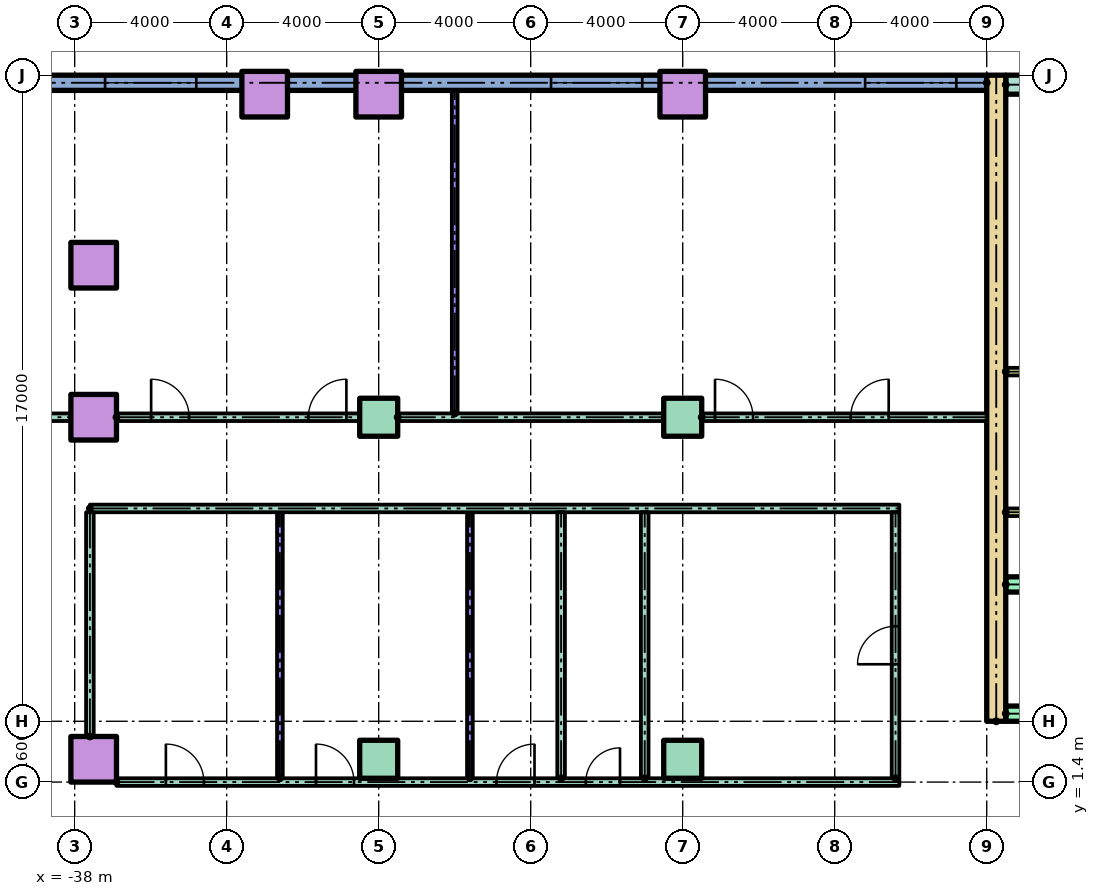
"""IFC4 building model, lengths in metres.
Left out: names, types, materials, properties, quantities, classifications, styles, units other than length and angle.
Written with IfcOpenShell. Run it as: python <this file> out.ifc"""

import sys

from ifc_helpers import new_model, si_unit, direction, frame, frame_2d, origin, origin_2d, place, context, subcontext, project, spatial, rectangle, hollow_rectangle, extrude, element, fill, save


model = new_model("IFC4")
c1 = context("Model", 3, precision=1e-05, world=origin(), true_north=direction((0.0, 1.0)))
c2 = subcontext(c1, "Body", "Model", "MODEL_VIEW")
j1 = project(units=[si_unit("LENGTHUNIT", "METRE"), si_unit("PLANEANGLEUNIT", "RADIAN")], contexts=[c1])
p1 = place(None, origin())
s1 = spatial("IfcSite", under=j1, at=p1, CompositionType="ELEMENT")
p2 = place(p1, origin())
s2 = spatial("IfcBuilding", under=s1, at=p2, CompositionType="ELEMENT")
p3 = place(p2, frame((0.0, 0.0, 18.0)))
s3 = spatial("IfcBuildingStorey", under=s2, at=p3, CompositionType="ELEMENT", Elevation=18.0)
p4 = place(p3, frame((-37.5, 2.0, 0.0)))
e1 = element("IfcColumn", 1, at=p4, inside=s3, PredefinedType="COLUMN", context=c2, shape_type="SweptSolid", body=[
    extrude(hollow_rectangle(XDim=1.2, YDim=1.2, WallThickness=0.06, at=origin_2d()), origin(), (0.0, 0.0, 1.0), 4.0),
])
for number, where in (
    (2, (-30.0, 2.0, 0.0)),
    (3, (-22.0, 2.0, 0.0)),
):
    element("IfcColumn", number, at=place(p3, frame(where)), inside=s3, PredefinedType="COLUMN", context=c2, shape_type="SweptSolid", body=[
        extrude(rectangle(XDim=1.0, YDim=1.0, at=origin_2d()), origin(), (0.0, 0.0, 1.0), 4.0),
    ])
p5 = place(p3, frame((-37.5, 11.0, 0.0)))
e4 = element("IfcColumn", 4, at=p5, inside=s3, PredefinedType="COLUMN", context=c2, shape_type="SweptSolid", body=[
    extrude(hollow_rectangle(XDim=1.2, YDim=1.2, WallThickness=0.06, at=origin_2d()), origin(), (0.0, 0.0, 1.0), 4.0),
])
for number, where in (
    (5, (-30.0, 11.0, 0.0)),
    (6, (-22.0, 11.0, 0.0)),
):
    element("IfcColumn", number, at=place(p3, frame(where)), inside=s3, PredefinedType="COLUMN", context=c2, shape_type="SweptSolid", body=[
        extrude(rectangle(XDim=1.0, YDim=1.0, at=origin_2d()), origin(), (0.0, 0.0, 1.0), 4.0),
    ])
for number, where in (
    (7, (-37.5, 15.0, 0.0)),
    (8, (-33.0, 19.5, 0.0)),
    (9, (-30.0, 19.5, 0.0)),
    (10, (-22.0, 19.5, 0.0)),
):
    element("IfcColumn", number, at=place(p3, frame(where)), inside=s3, PredefinedType="COLUMN", context=c2, shape_type="SweptSolid", body=[
        extrude(hollow_rectangle(XDim=1.2, YDim=1.2, WallThickness=0.06, at=origin_2d()), origin(), (0.0, 0.0, 1.0), 4.0),
    ])
p6 = place(p3, frame((-14.0, 19.8, 0.0), z_axis=(0.0, 0.0, 1.0), x_axis=(-1.0, 0.0, 0.0)))
e11 = element("IfcWall", 11, at=p6, inside=s3, PredefinedType="STANDARD", context=c2, shape_type="SweptSolid", body=[
    extrude(rectangle(XDim=25.6, YDim=0.4, at=frame_2d((12.8, 0.0))), origin(), (0.0, 0.0, 1.0), 3.7),
])
p7 = place(p6, frame((0.8, 0.0, 0.9)))
e12 = element("IfcOpeningElement", 12, at=p7, cuts=e11, PredefinedType="OPENING", context=c2, shape_type="SweptSolid", body=[
    extrude(rectangle(XDim=2.4, YDim=2.1, at=frame_2d((1.2, 1.05))), frame((0.0, 0.21, 0.0), z_axis=(0.0, -1.0, 0.0), x_axis=(1.0, 0.0, 0.0)), (0.0, 0.0, 1.0), 0.42),
])
p8 = place(p6, frame((9.065, 0.0, 0.9)))
e13 = element("IfcOpeningElement", 13, at=p8, cuts=e11, PredefinedType="OPENING", context=c2, shape_type="SweptSolid", body=[
    extrude(rectangle(XDim=2.4, YDim=2.1, at=frame_2d((1.2, 1.05))), frame((0.0, 0.21, 0.0), z_axis=(0.0, -1.0, 0.0), x_axis=(1.0, 0.0, 0.0)), (0.0, 0.0, 1.0), 0.42),
])
p9 = place(p6, frame((20.8, 0.0, 0.9)))
e14 = element("IfcOpeningElement", 14, at=p9, cuts=e11, PredefinedType="OPENING", context=c2, shape_type="SweptSolid", body=[
    extrude(rectangle(XDim=2.4, YDim=2.1, at=frame_2d((1.2, 1.05))), frame((0.0, 0.21, 0.0), z_axis=(0.0, -1.0, 0.0), x_axis=(1.0, 0.0, 0.0)), (0.0, 0.0, 1.0), 0.42),
])
p10 = place(p3, frame((-13.75, 3.0, 0.0), z_axis=(0.0, 0.0, 1.0), x_axis=(0.0, 1.0, 0.0)))
e15 = element("IfcWall", 15, at=p10, inside=s3, PredefinedType="SHEAR", context=c2, shape_type="SweptSolid", body=[
    extrude(rectangle(XDim=17.0, YDim=0.5, at=frame_2d((8.5, 0.0))), origin(), (0.0, 0.0, 1.0), 3.7),
])
p11 = place(p3, frame((-13.5, 19.75, 0.0)))
e16 = element("IfcWall", 16, at=p11, inside=s3, PredefinedType="SHEAR", context=c2, shape_type="SweptSolid", body=[
    extrude(rectangle(XDim=27.0, YDim=0.5, at=frame_2d((13.5, 0.0))), origin(), (0.0, 0.0, 1.0), 3.7),
])
p12 = place(p3, frame((-13.5, 3.2, 0.0)))
e17 = element("IfcWall", 17, at=p12, inside=s3, PredefinedType="SHEAR", context=c2, shape_type="SweptSolid", body=[
    extrude(rectangle(XDim=27.0, YDim=0.4, at=frame_2d((13.5, 0.0))), origin(), (0.0, 0.0, 1.0), 3.7),
])
p13 = place(p12, frame((6.861, 0.0, 0.0)))
e18 = element("IfcOpeningElement", 18, at=p13, cuts=e17, PredefinedType="OPENING", context=c2, shape_type="SweptSolid", body=[
    extrude(rectangle(XDim=1.1, YDim=2.1, at=frame_2d((0.55, 1.05))), frame((0.0, 0.21, 0.0), z_axis=(0.0, -1.0, 0.0), x_axis=(1.0, 0.0, 0.0)), (0.0, 0.0, 1.0), 0.42),
])
p14 = place(p12, frame((9.906, 0.0, 0.0)))
e19 = element("IfcOpeningElement", 19, at=p14, cuts=e17, PredefinedType="OPENING", context=c2, shape_type="SweptSolid", body=[
    extrude(rectangle(XDim=1.1, YDim=2.1, at=frame_2d((0.55, 1.05))), frame((0.0, 0.21, 0.0), z_axis=(0.0, -1.0, 0.0), x_axis=(1.0, 0.0, 0.0)), (0.0, 0.0, 1.0), 0.42),
])
p15 = place(p12, frame((15.994, 0.0, 0.0)))
e20 = element("IfcOpeningElement", 20, at=p15, cuts=e17, PredefinedType="OPENING", context=c2, shape_type="SweptSolid", body=[
    extrude(rectangle(XDim=1.1, YDim=2.1, at=frame_2d((0.55, 1.05))), frame((0.0, 0.21, 0.0), z_axis=(0.0, -1.0, 0.0), x_axis=(1.0, 0.0, 0.0)), (0.0, 0.0, 1.0), 0.42),
])
p16 = place(p12, frame((19.039, 0.0, 0.0)))
e21 = element("IfcOpeningElement", 21, at=p16, cuts=e17, PredefinedType="OPENING", context=c2, shape_type="SweptSolid", body=[
    extrude(rectangle(XDim=1.1, YDim=2.1, at=frame_2d((0.55, 1.05))), frame((0.0, 0.21, 0.0), z_axis=(0.0, -1.0, 0.0), x_axis=(1.0, 0.0, 0.0)), (0.0, 0.0, 1.0), 0.42),
])
p17 = place(p12, frame((12.6, 0.0, 0.0)))
e22 = element("IfcOpeningElement", 22, at=p17, cuts=e17, PredefinedType="OPENING", context=c2, shape_type="SweptSolid", body=[
    extrude(rectangle(XDim=1.8, YDim=2.1, at=frame_2d((0.9, 1.05))), frame((0.0, 0.21, 0.0), z_axis=(0.0, -1.0, 0.0), x_axis=(1.0, 0.0, 0.0)), (0.0, 0.0, 1.0), 0.42),
])
p18 = place(p3, frame((-13.5, 6.6, 0.0)))
e23 = element("IfcWall", 23, at=p18, inside=s3, PredefinedType="SHEAR", context=c2, shape_type="SweptSolid", body=[
    extrude(rectangle(XDim=11.978, YDim=0.4, at=frame_2d((5.989, 0.0))), origin(), (0.0, 0.0, 1.0), 3.7),
])
for number, where in (
    (24, (-13.5, 8.5, 0.0)),
    (25, (-13.5, 12.2, 0.0)),
):
    element("IfcWall", number, at=place(p3, frame(where)), inside=s3, PredefinedType="PARTITIONING", context=c2, shape_type="SweptSolid", body=[
        extrude(rectangle(XDim=3.9, YDim=0.2, at=frame_2d((1.95, 0.0))), origin(), (0.0, 0.0, 1.0), 3.7),
    ])
p19 = place(p3, frame((-36.9, 1.4, 0.0)))
e26 = element("IfcWall", 26, at=p19, inside=s3, PredefinedType="PARTITIONING", context=c2, shape_type="SweptSolid", body=[
    extrude(rectangle(XDim=20.6, YDim=0.2, at=frame_2d((10.3, 0.0))), origin(), (0.0, 0.0, 1.0), 3.7),
])
p20 = place(p19, frame((1.3, 0.0, 0.0)))
e27 = element("IfcOpeningElement", 27, at=p20, cuts=e26, PredefinedType="OPENING", context=c2, shape_type="SweptSolid", body=[
    extrude(rectangle(XDim=1.0, YDim=2.1, at=frame_2d((0.5, 1.05))), frame((0.0, 0.11, 0.0), z_axis=(0.0, -1.0, 0.0), x_axis=(1.0, 0.0, 0.0)), (0.0, 0.0, 1.0), 0.22),
])
p21 = place(p19, frame((5.25, 0.0, 0.0)))
e28 = element("IfcOpeningElement", 28, at=p21, cuts=e26, PredefinedType="OPENING", context=c2, shape_type="SweptSolid", body=[
    extrude(rectangle(XDim=1.0, YDim=2.1, at=frame_2d((0.5, 1.05))), frame((0.0, 0.11, 0.0), z_axis=(0.0, -1.0, 0.0), x_axis=(1.0, 0.0, 0.0)), (0.0, 0.0, 1.0), 0.22),
])
p22 = place(p19, frame((10.0, 0.0, 0.0)))
e29 = element("IfcOpeningElement", 29, at=p22, cuts=e26, PredefinedType="OPENING", context=c2, shape_type="SweptSolid", body=[
    extrude(rectangle(XDim=1.0, YDim=2.1, at=frame_2d((0.5, 1.05))), frame((0.0, 0.11, 0.0), z_axis=(0.0, -1.0, 0.0), x_axis=(1.0, 0.0, 0.0)), (0.0, 0.0, 1.0), 0.22),
])
p23 = place(p19, frame((12.35, 0.0, 0.0)))
e30 = element("IfcOpeningElement", 30, at=p23, cuts=e26, PredefinedType="OPENING", context=c2, shape_type="SweptSolid", body=[
    extrude(rectangle(XDim=0.9, YDim=2.1, at=frame_2d((0.45, 1.05))), frame((0.0, 0.11, 0.0), z_axis=(0.0, -1.0, 0.0), x_axis=(1.0, 0.0, 0.0)), (0.0, 0.0, 1.0), 0.22),
])
p24 = place(p3, frame((-37.6, 8.6, 0.0)))
e31 = element("IfcWall", 31, at=p24, inside=s3, PredefinedType="PARTITIONING", context=c2, shape_type="SweptSolid", body=[
    extrude(rectangle(XDim=21.3, YDim=0.2, at=frame_2d((10.65, 0.0))), origin(), (0.0, 0.0, 1.0), 3.7),
])
p25 = place(p3, frame((-39.6, 11.0, 0.0)))
e32 = element("IfcWall", 32, at=p25, inside=s3, PredefinedType="PARTITIONING", context=c2, shape_type="SweptSolid", body=[
    extrude(rectangle(XDim=1.5, YDim=0.2, at=frame_2d((0.75, 0.0))), origin(), (0.0, 0.0, 1.0), 3.7),
])
p26 = place(p3, frame((-36.9, 11.0, 0.0)))
e33 = element("IfcWall", 33, at=p26, inside=s3, PredefinedType="PARTITIONING", context=c2, shape_type="SweptSolid", body=[
    extrude(rectangle(XDim=6.4, YDim=0.2, at=frame_2d((3.2, 0.0))), origin(), (0.0, 0.0, 1.0), 3.7),
])
p27 = place(p26, frame((0.912, 0.0, 0.0)))
e34 = element("IfcOpeningElement", 34, at=p27, cuts=e33, PredefinedType="OPENING", context=c2, shape_type="SweptSolid", body=[
    extrude(rectangle(XDim=1.0, YDim=2.1, at=frame_2d((0.5, 1.05))), frame((0.0, 0.11, 0.0), z_axis=(0.0, -1.0, 0.0), x_axis=(1.0, 0.0, 0.0)), (0.0, 0.0, 1.0), 0.22),
])
p28 = place(p26, frame((5.05, 0.0, 0.0)))
e35 = element("IfcOpeningElement", 35, at=p28, cuts=e33, PredefinedType="OPENING", context=c2, shape_type="SweptSolid", body=[
    extrude(rectangle(XDim=1.0, YDim=2.1, at=frame_2d((0.5, 1.05))), frame((0.0, 0.11, 0.0), z_axis=(0.0, -1.0, 0.0), x_axis=(1.0, 0.0, 0.0)), (0.0, 0.0, 1.0), 0.22),
])
p29 = place(p3, frame((-29.5, 11.0, 0.0)))
e36 = element("IfcWall", 36, at=p29, inside=s3, PredefinedType="PARTITIONING", context=c2, shape_type="SweptSolid", body=[
    extrude(rectangle(XDim=7.0, YDim=0.2, at=frame_2d((3.5, 0.0))), origin(), (0.0, 0.0, 1.0), 3.7),
])
p30 = place(p3, frame((-21.5, 11.0, 0.0)))
e37 = element("IfcWall", 37, at=p30, inside=s3, PredefinedType="PARTITIONING", context=c2, shape_type="SweptSolid", body=[
    extrude(rectangle(XDim=7.5, YDim=0.2, at=frame_2d((3.75, 0.0))), origin(), (0.0, 0.0, 1.0), 3.7),
])
p31 = place(p30, frame((0.35, 0.0, 0.0)))
e38 = element("IfcOpeningElement", 38, at=p31, cuts=e37, PredefinedType="OPENING", context=c2, shape_type="SweptSolid", body=[
    extrude(rectangle(XDim=1.0, YDim=2.1, at=frame_2d((0.5, 1.05))), frame((0.0, 0.11, 0.0), z_axis=(0.0, -1.0, 0.0), x_axis=(1.0, 0.0, 0.0)), (0.0, 0.0, 1.0), 0.22),
])
p32 = place(p30, frame((3.92, 0.0, 0.0)))
e39 = element("IfcOpeningElement", 39, at=p32, cuts=e37, PredefinedType="OPENING", context=c2, shape_type="SweptSolid", body=[
    extrude(rectangle(XDim=1.0, YDim=2.1, at=frame_2d((0.5, 1.05))), frame((0.0, 0.11, 0.0), z_axis=(0.0, -1.0, 0.0), x_axis=(1.0, 0.0, 0.0)), (0.0, 0.0, 1.0), 0.22),
])
p33 = place(p3, frame((-37.6, 2.6, 0.0), z_axis=(0.0, 0.0, 1.0), x_axis=(0.0, 1.0, 0.0)))
e40 = element("IfcWall", 40, at=p33, inside=s3, PredefinedType="PARTITIONING", context=c2, shape_type="SweptSolid", body=[
    extrude(rectangle(XDim=5.9, YDim=0.2, at=frame_2d((2.95, 0.0))), origin(), (0.0, 0.0, 1.0), 3.7),
])
p34 = place(p3, frame((-32.6, 1.5, 0.0), z_axis=(0.0, 0.0, 1.0), x_axis=(0.0, 1.0, 0.0)))
e41 = element("IfcWall", 41, at=p34, inside=s3, PredefinedType="PARTITIONING", context=c2, shape_type="SweptSolid", body=[
    extrude(rectangle(XDim=7.0, YDim=0.15, at=frame_2d((3.5, 0.0))), origin(), (0.0, 0.0, 1.0), 3.7),
])
p35 = place(p3, frame((-28.0, 11.1, 0.0), z_axis=(0.0, 0.0, 1.0), x_axis=(0.0, 1.0, 0.0)))
e42 = element("IfcWall", 42, at=p35, inside=s3, PredefinedType="PARTITIONING", context=c2, shape_type="SweptSolid", body=[
    extrude(rectangle(XDim=8.5, YDim=0.15, at=frame_2d((4.25, 0.0))), origin(), (0.0, 0.0, 1.0), 3.7),
])
p36 = place(p3, frame((-27.6, 1.5, 0.0), z_axis=(0.0, 0.0, 1.0), x_axis=(0.0, 1.0, 0.0)))
e43 = element("IfcWall", 43, at=p36, inside=s3, PredefinedType="PARTITIONING", context=c2, shape_type="SweptSolid", body=[
    extrude(rectangle(XDim=7.0, YDim=0.15, at=frame_2d((3.5, 0.0))), origin(), (0.0, 0.0, 1.0), 3.7),
])
for number, where, z_axis, x_axis in (
    (44, (-25.2, 1.5, 0.0), (0.0, 0.0, 1.0), (0.0, 1.0, 0.0)),
    (45, (-23.0, 1.5, 0.0), (0.0, 0.0, 1.0), (0.0, 1.0, 0.0)),
):
    element("IfcWall", number, at=place(p3, frame(where, z_axis=z_axis, x_axis=x_axis)), inside=s3, PredefinedType="PARTITIONING", context=c2, shape_type="SweptSolid", body=[
        extrude(rectangle(XDim=7.0, YDim=0.2, at=frame_2d((3.5, 0.0))), origin(), (0.0, 0.0, 1.0), 3.7),
    ])
p37 = place(p3, frame((-16.4, 1.5, 0.0), z_axis=(0.0, 0.0, 1.0), x_axis=(0.0, 1.0, 0.0)))
e46 = element("IfcWall", 46, at=p37, inside=s3, PredefinedType="PARTITIONING", context=c2, shape_type="SweptSolid", body=[
    extrude(rectangle(XDim=7.0, YDim=0.2, at=frame_2d((3.5, 0.0))), origin(), (0.0, 0.0, 1.0), 3.7),
])
p38 = place(p37, frame((3.0, 0.0, 0.0)))
e47 = element("IfcOpeningElement", 47, at=p38, cuts=e46, PredefinedType="OPENING", context=c2, shape_type="SweptSolid", body=[
    extrude(rectangle(XDim=1.0, YDim=2.1, at=frame_2d((0.5, 1.05))), frame((0.0, 0.11, 0.0), z_axis=(0.0, -1.0, 0.0), x_axis=(1.0, 0.0, 0.0)), (0.0, 0.0, 1.0), 0.22),
])
p39 = place(p7, origin())
e48 = element("IfcWindow", 48, at=p39, inside=s3, PartitioningType="SINGLE_PANEL", PredefinedType="WINDOW", context=c2, shape_type="SweptSolid", body=[
    extrude(rectangle(XDim=2.4, YDim=2.1, at=frame_2d((1.2, 1.05))), frame((0.0, 0.03, 0.0), z_axis=(0.0, -1.0, 0.0), x_axis=(1.0, 0.0, 0.0)), (0.0, 0.0, 1.0), 0.06),
])
fill(e12, e48)
p40 = place(p8, origin())
e49 = element("IfcWindow", 49, at=p40, inside=s3, PartitioningType="SINGLE_PANEL", PredefinedType="WINDOW", context=c2, shape_type="SweptSolid", body=[
    extrude(rectangle(XDim=2.4, YDim=2.1, at=frame_2d((1.2, 1.05))), frame((0.0, 0.03, 0.0), z_axis=(0.0, -1.0, 0.0), x_axis=(1.0, 0.0, 0.0)), (0.0, 0.0, 1.0), 0.06),
])
fill(e13, e49)
p41 = place(p9, origin())
e50 = element("IfcWindow", 50, at=p41, inside=s3, PartitioningType="SINGLE_PANEL", PredefinedType="WINDOW", context=c2, shape_type="SweptSolid", body=[
    extrude(rectangle(XDim=2.4, YDim=2.1, at=frame_2d((1.2, 1.05))), frame((0.0, 0.03, 0.0), z_axis=(0.0, -1.0, 0.0), x_axis=(1.0, 0.0, 0.0)), (0.0, 0.0, 1.0), 0.06),
])
fill(e14, e50)
p42 = place(p20, origin())
e51 = element("IfcDoor", 51, at=p42, inside=s3, OperationType="SINGLE_SWING_LEFT", PredefinedType="DOOR", context=c2, shape_type="SweptSolid", body=[
    extrude(rectangle(XDim=1.0, YDim=2.1, at=frame_2d((0.5, 1.05))), frame((0.0, 0.025, 0.0), z_axis=(0.0, -1.0, 0.0), x_axis=(1.0, 0.0, 0.0)), (0.0, 0.0, 1.0), 0.05),
])
fill(e27, e51)
p43 = place(p21, origin())
e52 = element("IfcDoor", 52, at=p43, inside=s3, OperationType="SINGLE_SWING_LEFT", PredefinedType="DOOR", context=c2, shape_type="SweptSolid", body=[
    extrude(rectangle(XDim=1.0, YDim=2.1, at=frame_2d((0.5, 1.05))), frame((0.0, 0.025, 0.0), z_axis=(0.0, -1.0, 0.0), x_axis=(1.0, 0.0, 0.0)), (0.0, 0.0, 1.0), 0.05),
])
fill(e28, e52)
p44 = place(p22, origin())
e53 = element("IfcDoor", 53, at=p44, inside=s3, OperationType="SINGLE_SWING_RIGHT", PredefinedType="DOOR", context=c2, shape_type="SweptSolid", body=[
    extrude(rectangle(XDim=1.0, YDim=2.1, at=frame_2d((0.5, 1.05))), frame((0.0, 0.025, 0.0), z_axis=(0.0, -1.0, 0.0), x_axis=(1.0, 0.0, 0.0)), (0.0, 0.0, 1.0), 0.05),
])
fill(e29, e53)
p45 = place(p23, origin())
e54 = element("IfcDoor", 54, at=p45, inside=s3, OperationType="SINGLE_SWING_RIGHT", PredefinedType="DOOR", context=c2, shape_type="SweptSolid", body=[
    extrude(rectangle(XDim=0.9, YDim=2.1, at=frame_2d((0.45, 1.05))), frame((0.0, 0.025, 0.0), z_axis=(0.0, -1.0, 0.0), x_axis=(1.0, 0.0, 0.0)), (0.0, 0.0, 1.0), 0.05),
])
fill(e30, e54)
p46 = place(p38, origin())
e55 = element("IfcDoor", 55, at=p46, inside=s3, OperationType="SINGLE_SWING_LEFT", PredefinedType="DOOR", context=c2, shape_type="SweptSolid", body=[
    extrude(rectangle(XDim=1.0, YDim=2.1, at=frame_2d((0.5, 1.05))), frame((0.0, 0.025, 0.0), z_axis=(0.0, -1.0, 0.0), x_axis=(1.0, 0.0, 0.0)), (0.0, 0.0, 1.0), 0.05),
])
fill(e47, e55)
p47 = place(p27, origin())
e56 = element("IfcDoor", 56, at=p47, inside=s3, OperationType="SINGLE_SWING_LEFT", PredefinedType="DOOR", context=c2, shape_type="SweptSolid", body=[
    extrude(rectangle(XDim=1.0, YDim=2.1, at=frame_2d((0.5, 1.05))), frame((0.0, 0.025, 0.0), z_axis=(0.0, -1.0, 0.0), x_axis=(1.0, 0.0, 0.0)), (0.0, 0.0, 1.0), 0.05),
])
fill(e34, e56)
p48 = place(p28, origin())
e57 = element("IfcDoor", 57, at=p48, inside=s3, OperationType="SINGLE_SWING_RIGHT", PredefinedType="DOOR", context=c2, shape_type="SweptSolid", body=[
    extrude(rectangle(XDim=1.0, YDim=2.1, at=frame_2d((0.5, 1.05))), frame((0.0, 0.025, 0.0), z_axis=(0.0, -1.0, 0.0), x_axis=(1.0, 0.0, 0.0)), (0.0, 0.0, 1.0), 0.05),
])
fill(e35, e57)
p49 = place(p31, origin())
e58 = element("IfcDoor", 58, at=p49, inside=s3, OperationType="SINGLE_SWING_LEFT", PredefinedType="DOOR", context=c2, shape_type="SweptSolid", body=[
    extrude(rectangle(XDim=1.0, YDim=2.1, at=frame_2d((0.5, 1.05))), frame((0.0, 0.025, 0.0), z_axis=(0.0, -1.0, 0.0), x_axis=(1.0, 0.0, 0.0)), (0.0, 0.0, 1.0), 0.05),
])
fill(e38, e58)
p50 = place(p32, origin())
e59 = element("IfcDoor", 59, at=p50, inside=s3, OperationType="SINGLE_SWING_RIGHT", PredefinedType="DOOR", context=c2, shape_type="SweptSolid", body=[
    extrude(rectangle(XDim=1.0, YDim=2.1, at=frame_2d((0.5, 1.05))), frame((0.0, 0.025, 0.0), z_axis=(0.0, -1.0, 0.0), x_axis=(1.0, 0.0, 0.0)), (0.0, 0.0, 1.0), 0.05),
])
fill(e39, e59)
save(model, sys.argv[1])
